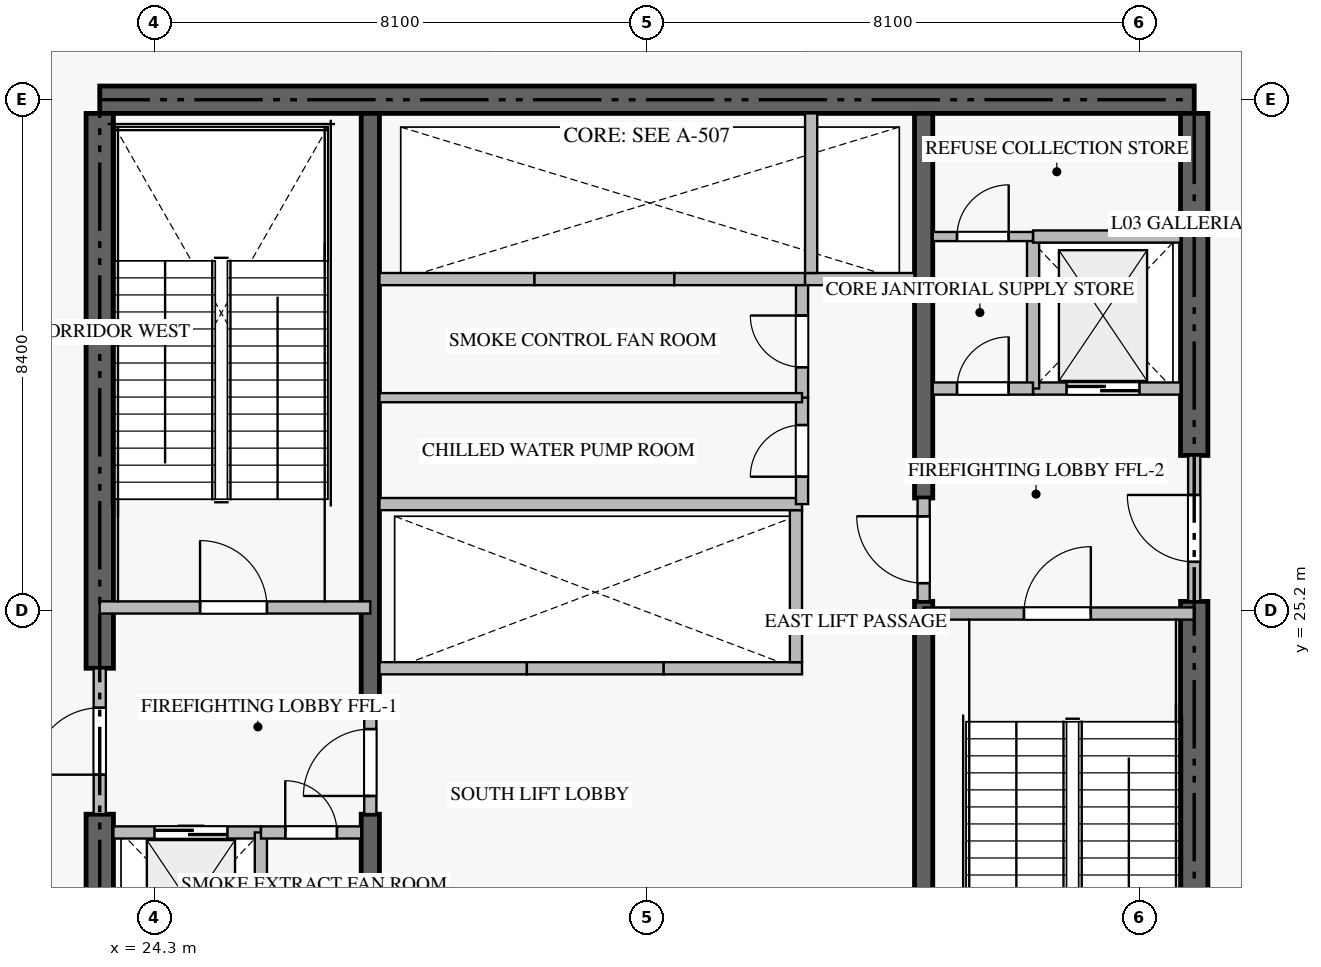
"""IFC4 building model, lengths in metres.
Left out: names, types, materials, properties, quantities, classifications, styles, units other than length and angle.
Written with IfcOpenShell. Run it as: python <this file> out.ifc"""

import sys

from ifc_helpers import new_model, si_unit, direction, frame, frame_2d, origin, place, context, subcontext, project, spatial, rectangle, extrude, source, transform, mapped, element, fill, save


model = new_model("IFC4")
c1 = context("Model", 3, precision=1e-05, world=origin(), true_north=direction((0.0, 1.0)))
c2 = subcontext(c1, "Body", "Model", "MODEL_VIEW")
j1 = project(units=[si_unit("LENGTHUNIT", "METRE"), si_unit("PLANEANGLEUNIT", "RADIAN")], contexts=[c1])
p1 = place(None, origin())
s1 = spatial("IfcSite", under=j1, at=p1, CompositionType="ELEMENT")
p2 = place(p1, origin())
s2 = spatial("IfcBuilding", under=s1, at=p2, CompositionType="ELEMENT")
p3 = place(p2, frame((0.0, 0.0, 15.3)))
s3 = spatial("IfcBuildingStorey", under=s2, at=p3, CompositionType="ELEMENT", Elevation=15.3)
p4 = place(p3, frame((41.4, 33.6, -0.38), z_axis=(0.0, 0.0, 1.0), x_axis=(-1.0, 0.0, 0.0)))
e1 = element("IfcWall", 1, at=p4, inside=s3, PredefinedType="SHEAR", context=c2, shape_type="SweptSolid", body=[
    extrude(rectangle(XDim=18.0, YDim=0.45, at=frame_2d((9.0, 0.0))), origin(), (0.0, 0.0, 1.0), 5.228),
])
p5 = place(p3, frame((23.4, 17.025, -0.38), z_axis=(0.0, 0.0, 1.0), x_axis=(0.0, 1.0, 0.0)))
e2 = element("IfcWall", 2, at=p5, inside=s3, PredefinedType="SHEAR", context=c2, shape_type="SweptSolid", body=[
    extrude(rectangle(XDim=4.825, YDim=0.45, at=frame_2d((2.413, 0.0))), origin(), (0.0, 0.0, 1.0), 5.228),
])
p6 = place(p3, frame((23.4, 24.25, -0.38), z_axis=(0.0, 0.0, 1.0), x_axis=(0.0, 1.0, 0.0)))
e3 = element("IfcWall", 3, at=p6, inside=s3, PredefinedType="SHEAR", context=c2, shape_type="SweptSolid", body=[
    extrude(rectangle(XDim=9.125, YDim=0.45, at=frame_2d((4.562, 0.0))), origin(), (0.0, 0.0, 1.0), 5.228),
])
p7 = place(p3, frame((41.4, 17.025, -0.38), z_axis=(0.0, 0.0, 1.0), x_axis=(0.0, 1.0, 0.0)))
e4 = element("IfcWall", 4, at=p7, inside=s3, PredefinedType="SHEAR", context=c2, shape_type="SweptSolid", body=[
    extrude(rectangle(XDim=8.325, YDim=0.45, at=frame_2d((4.163, 0.0))), origin(), (0.0, 0.0, 1.0), 5.228),
])
p8 = place(p3, frame((41.4, 27.75, -0.38), z_axis=(0.0, 0.0, 1.0), x_axis=(0.0, 1.0, 0.0)))
e5 = element("IfcWall", 5, at=p8, inside=s3, PredefinedType="SHEAR", context=c2, shape_type="SweptSolid", body=[
    extrude(rectangle(XDim=5.625, YDim=0.45, at=frame_2d((2.812, 0.0))), origin(), (0.0, 0.0, 1.0), 5.228),
])
p9 = place(p3, frame((27.85, 17.025, -0.38), z_axis=(0.0, 0.0, 1.0), x_axis=(0.0, 1.0, 0.0)))
e6 = element("IfcWall", 6, at=p9, inside=s3, PredefinedType="SHEAR", context=c2, shape_type="SweptSolid", body=[
    extrude(rectangle(XDim=4.825, YDim=0.3, at=frame_2d((2.413, 0.0))), origin(), (0.0, 0.0, 1.0), 5.228),
])
p10 = place(p3, frame((27.85, 23.55, -0.38), z_axis=(0.0, 0.0, 1.0), x_axis=(0.0, 1.0, 0.0)))
e7 = element("IfcWall", 7, at=p10, inside=s3, PredefinedType="SHEAR", context=c2, shape_type="SweptSolid", body=[
    extrude(rectangle(XDim=9.825, YDim=0.3, at=frame_2d((4.913, 0.0))), origin(), (0.0, 0.0, 1.0), 5.228),
])
p11 = place(p3, frame((36.95, 17.025, -0.38), z_axis=(0.0, 0.0, 1.0), x_axis=(0.0, 1.0, 0.0)))
e8 = element("IfcWall", 8, at=p11, inside=s3, PredefinedType="SHEAR", context=c2, shape_type="SweptSolid", body=[
    extrude(rectangle(XDim=8.325, YDim=0.3, at=frame_2d((4.163, 0.0))), origin(), (0.0, 0.0, 1.0), 5.228),
])
p12 = place(p3, frame((36.95, 27.05, -0.38), z_axis=(0.0, 0.0, 1.0), x_axis=(0.0, 1.0, 0.0)))
e9 = element("IfcWall", 9, at=p12, inside=s3, PredefinedType="SHEAR", context=c2, shape_type="SweptSolid", body=[
    extrude(rectangle(XDim=6.325, YDim=0.3, at=frame_2d((3.163, 0.0))), origin(), (0.0, 0.0, 1.0), 5.228),
])
p13 = place(p3, frame((23.4, 25.25, 0.0), z_axis=(0.0, 0.0, 1.0), x_axis=(1.0, 0.0, 0.0)))
e10 = element("IfcWall", 10, at=p13, inside=s3, PredefinedType="STANDARD", context=c2, shape_type="SweptSolid", body=[
    extrude(rectangle(XDim=4.45, YDim=0.2, at=frame_2d((2.225, 0.0))), origin(), (0.0, 0.0, 1.0), 4.85),
])
p14 = place(p13, frame((1.65, 0.0, 0.0)))
e11 = element("IfcOpeningElement", 11, at=p14, cuts=e10, PredefinedType="OPENING", context=c2, shape_type="SweptSolid", body=[
    extrude(rectangle(XDim=1.1, YDim=2.15, at=frame_2d((0.55, 1.075))), frame((0.0, 0.11, 0.0), z_axis=(0.0, -1.0, 0.0), x_axis=(1.0, 0.0, 0.0)), (0.0, 0.0, 1.0), 0.22),
])
p15 = place(p3, frame((36.95, 25.15, 0.0), z_axis=(0.0, 0.0, 1.0), x_axis=(1.0, 0.0, 0.0)))
e12 = element("IfcWall", 12, at=p15, inside=s3, PredefinedType="STANDARD", context=c2, shape_type="SweptSolid", body=[
    extrude(rectangle(XDim=4.45, YDim=0.2, at=frame_2d((2.225, 0.0))), origin(), (0.0, 0.0, 1.0), 4.85),
])
p16 = place(p15, frame((1.65, 0.0, 0.0)))
e13 = element("IfcOpeningElement", 13, at=p16, cuts=e12, PredefinedType="OPENING", context=c2, shape_type="SweptSolid", body=[
    extrude(rectangle(XDim=1.1, YDim=2.15, at=frame_2d((0.55, 1.075))), frame((0.0, 0.11, 0.0), z_axis=(0.0, -1.0, 0.0), x_axis=(1.0, 0.0, 0.0)), (0.0, 0.0, 1.0), 0.22),
])
p17 = place(p3, frame((23.625, 21.55, 0.0), z_axis=(0.0, 0.0, 1.0), x_axis=(1.0, 0.0, 0.0)))
e14 = element("IfcWall", 14, at=p17, inside=s3, PredefinedType="STANDARD", context=c2, shape_type="SweptSolid", body=[
    extrude(rectangle(XDim=2.425, YDim=0.2, at=frame_2d((1.212, 0.0))), origin(), (0.0, 0.0, 1.0), 4.85),
])
p18 = place(p17, frame((0.675, 0.0, 0.0)))
e15 = element("IfcOpeningElement", 15, at=p18, cuts=e14, PredefinedType="OPENING", context=c2, shape_type="SweptSolid", body=[
    extrude(rectangle(XDim=1.2, YDim=2.2, at=frame_2d((0.6, 1.1))), frame((0.0, 0.11, 0.0), z_axis=(0.0, -1.0, 0.0), x_axis=(1.0, 0.0, 0.0)), (0.0, 0.0, 1.0), 0.22),
])
p19 = place(p3, frame((38.75, 28.85, 0.0), z_axis=(0.0, 0.0, 1.0), x_axis=(1.0, 0.0, 0.0)))
e16 = element("IfcWall", 16, at=p19, inside=s3, PredefinedType="STANDARD", context=c2, shape_type="SweptSolid", body=[
    extrude(rectangle(XDim=2.425, YDim=0.2, at=frame_2d((1.212, 0.0))), origin(), (0.0, 0.0, 1.0), 4.85),
])
p20 = place(p19, frame((0.55, 0.0, 0.0)))
e17 = element("IfcOpeningElement", 17, at=p20, cuts=e16, PredefinedType="OPENING", context=c2, shape_type="SweptSolid", body=[
    extrude(rectangle(XDim=1.2, YDim=2.2, at=frame_2d((0.6, 1.1))), frame((0.0, 0.11, 0.0), z_axis=(0.0, -1.0, 0.0), x_axis=(1.0, 0.0, 0.0)), (0.0, 0.0, 1.0), 0.22),
])
p21 = place(p3, frame((28.0, 24.25, 0.0), z_axis=(0.0, 0.0, 1.0), x_axis=(1.0, 0.0, 0.0)))
e18 = element("IfcWall", 18, at=p21, inside=s3, PredefinedType="STANDARD", context=c2, shape_type="SweptSolid", body=[
    extrude(rectangle(XDim=2.425, YDim=0.2, at=frame_2d((1.212, 0.0))), origin(), (0.0, 0.0, 1.0), 4.85),
])
p22 = place(p3, frame((30.425, 24.25, 0.0), z_axis=(0.0, 0.0, 1.0), x_axis=(1.0, 0.0, 0.0)))
e19 = element("IfcWall", 19, at=p22, inside=s3, PredefinedType="STANDARD", context=c2, shape_type="SweptSolid", body=[
    extrude(rectangle(XDim=2.25, YDim=0.2, at=frame_2d((1.125, 0.0))), origin(), (0.0, 0.0, 1.0), 4.85),
])
p23 = place(p3, frame((32.675, 24.25, 0.0), z_axis=(0.0, 0.0, 1.0), x_axis=(1.0, 0.0, 0.0)))
e20 = element("IfcWall", 20, at=p23, inside=s3, PredefinedType="STANDARD", context=c2, shape_type="SweptSolid", body=[
    extrude(rectangle(XDim=2.275, YDim=0.2, at=frame_2d((1.137, 0.0))), origin(), (0.0, 0.0, 1.0), 4.85),
])
p24 = place(p3, frame((34.85, 24.35, 0.0), z_axis=(0.0, 0.0, 1.0), x_axis=(0.0, 1.0, 0.0)))
e21 = element("IfcWall", 21, at=p24, inside=s3, PredefinedType="STANDARD", context=c2, shape_type="SweptSolid", body=[
    extrude(rectangle(XDim=2.5, YDim=0.2, at=frame_2d((1.25, 0.0))), origin(), (0.0, 0.0, 1.0), 4.85),
])
p25 = place(p3, frame((28.0, 30.65, 0.0), z_axis=(0.0, 0.0, 1.0), x_axis=(1.0, 0.0, 0.0)))
e22 = element("IfcWall", 22, at=p25, inside=s3, PredefinedType="STANDARD", context=c2, shape_type="SweptSolid", body=[
    extrude(rectangle(XDim=2.55, YDim=0.2, at=frame_2d((1.275, 0.0))), origin(), (0.0, 0.0, 1.0), 4.85),
])
p26 = place(p3, frame((30.55, 30.65, 0.0), z_axis=(0.0, 0.0, 1.0), x_axis=(1.0, 0.0, 0.0)))
e23 = element("IfcWall", 23, at=p26, inside=s3, PredefinedType="STANDARD", context=c2, shape_type="SweptSolid", body=[
    extrude(rectangle(XDim=2.3, YDim=0.2, at=frame_2d((1.15, 0.0))), origin(), (0.0, 0.0, 1.0), 4.85),
])
p27 = place(p3, frame((32.85, 30.65, 0.0), z_axis=(0.0, 0.0, 1.0), x_axis=(1.0, 0.0, 0.0)))
e24 = element("IfcWall", 24, at=p27, inside=s3, PredefinedType="STANDARD", context=c2, shape_type="SweptSolid", body=[
    extrude(rectangle(XDim=2.15, YDim=0.2, at=frame_2d((1.075, 0.0))), origin(), (0.0, 0.0, 1.0), 4.85),
])
p28 = place(p3, frame((35.0, 30.65, 0.0), z_axis=(0.0, 0.0, 1.0), x_axis=(1.0, 0.0, 0.0)))
e25 = element("IfcWall", 25, at=p28, inside=s3, PredefinedType="STANDARD", context=c2, shape_type="SweptSolid", body=[
    extrude(rectangle(XDim=1.8, YDim=0.2, at=frame_2d((0.9, 0.0))), origin(), (0.0, 0.0, 1.0), 4.85),
])
p29 = place(p3, frame((35.1, 30.75, 0.0), z_axis=(0.0, 0.0, 1.0), x_axis=(0.0, 1.0, 0.0)))
e26 = element("IfcWall", 26, at=p29, inside=s3, PredefinedType="STANDARD", context=c2, shape_type="SweptSolid", body=[
    extrude(rectangle(XDim=2.625, YDim=0.2, at=frame_2d((1.312, 0.0))), origin(), (0.0, 0.0, 1.0), 4.85),
])
p30 = place(p3, frame((26.05, 19.05, 0.0), z_axis=(0.0, 0.0, 1.0), x_axis=(0.0, 1.0, 0.0)))
e27 = element("IfcWall", 27, at=p30, inside=s3, PredefinedType="STANDARD", context=c2, shape_type="SweptSolid", body=[
    extrude(rectangle(XDim=2.5, YDim=0.2, at=frame_2d((1.25, 0.0))), origin(), (0.0, 0.0, 1.0), 4.85),
])
p31 = place(p3, frame((26.052, 21.55, 0.0), z_axis=(0.0, 0.0, 1.0), x_axis=(1.0, 0.0, 0.0)))
e28 = element("IfcWall", 28, at=p31, inside=s3, PredefinedType="STANDARD", context=c2, shape_type="SweptSolid", body=[
    extrude(rectangle(XDim=1.648, YDim=0.2, at=frame_2d((0.824, 0.0))), origin(), (0.0, 0.0, 1.0), 4.85),
])
p32 = place(p31, frame((0.399, 0.0, 0.0)))
e29 = element("IfcOpeningElement", 29, at=p32, cuts=e28, PredefinedType="OPENING", context=c2, shape_type="SweptSolid", body=[
    extrude(rectangle(XDim=0.85, YDim=2.1, at=frame_2d((0.425, 1.05))), frame((0.0, 0.11, 0.0), z_axis=(0.0, -1.0, 0.0), x_axis=(1.0, 0.0, 0.0)), (0.0, 0.0, 1.0), 0.22),
])
p33 = place(p3, frame((38.75, 28.85, 0.0), z_axis=(0.0, 0.0, 1.0), x_axis=(0.0, 1.0, 0.0)))
e30 = element("IfcWall", 30, at=p33, inside=s3, PredefinedType="STANDARD", context=c2, shape_type="SweptSolid", body=[
    extrude(rectangle(XDim=2.5, YDim=0.2, at=frame_2d((1.25, 0.0))), origin(), (0.0, 0.0, 1.0), 4.85),
])
p34 = place(p3, frame((38.75, 31.35, 0.0), z_axis=(0.0, 0.0, 1.0), x_axis=(1.0, 0.0, 0.0)))
e31 = element("IfcWall", 31, at=p34, inside=s3, PredefinedType="STANDARD", context=c2, shape_type="SweptSolid", body=[
    extrude(rectangle(XDim=2.425, YDim=0.2, at=frame_2d((1.212, 0.0))), origin(), (0.0, 0.0, 1.0), 4.85),
])
p35 = place(p3, frame((37.1, 28.85, 0.0), z_axis=(0.0, 0.0, 1.0), x_axis=(1.0, 0.0, 0.0)))
e32 = element("IfcWall", 32, at=p35, inside=s3, PredefinedType="STANDARD", context=c2, shape_type="SweptSolid", body=[
    extrude(rectangle(XDim=1.648, YDim=0.2, at=frame_2d((0.824, 0.0))), origin(), (0.0, 0.0, 1.0), 4.85),
])
p36 = place(p35, frame((0.399, 0.0, 0.0)))
e33 = element("IfcOpeningElement", 33, at=p36, cuts=e32, PredefinedType="OPENING", context=c2, shape_type="SweptSolid", body=[
    extrude(rectangle(XDim=0.85, YDim=2.1, at=frame_2d((0.425, 1.05))), frame((0.0, 0.11, 0.0), z_axis=(0.0, -1.0, 0.0), x_axis=(1.0, 0.0, 0.0)), (0.0, 0.0, 1.0), 0.22),
])
p37 = place(p3, frame((23.4, 21.852, 0.0), z_axis=(0.0, 0.0, 1.0), x_axis=(0.0, 1.0, 0.0)))
e34 = element("IfcWall", 34, at=p37, inside=s3, PredefinedType="STANDARD", context=c2, shape_type="SweptSolid", body=[
    extrude(rectangle(XDim=2.396, YDim=0.2, at=frame_2d((1.198, 0.0))), origin(), (0.0, 0.0, 1.0), 4.85),
])
p38 = place(p37, frame((0.648, 0.0, 0.0)))
e35 = element("IfcOpeningElement", 35, at=p38, cuts=e34, PredefinedType="OPENING", context=c2, shape_type="SweptSolid", body=[
    extrude(rectangle(XDim=1.1, YDim=2.15, at=frame_2d((0.55, 1.075))), frame((0.0, 0.11, 0.0), z_axis=(0.0, -1.0, 0.0), x_axis=(1.0, 0.0, 0.0)), (0.0, 0.0, 1.0), 0.22),
])
p39 = place(p3, frame((41.4, 25.352, 0.0), z_axis=(0.0, 0.0, 1.0), x_axis=(0.0, 1.0, 0.0)))
e36 = element("IfcWall", 36, at=p39, inside=s3, PredefinedType="STANDARD", context=c2, shape_type="SweptSolid", body=[
    extrude(rectangle(XDim=2.396, YDim=0.2, at=frame_2d((1.198, 0.0))), origin(), (0.0, 0.0, 1.0), 4.85),
])
p40 = place(p39, frame((0.648, 0.0, 0.0)))
e37 = element("IfcOpeningElement", 37, at=p40, cuts=e36, PredefinedType="OPENING", context=c2, shape_type="SweptSolid", body=[
    extrude(rectangle(XDim=1.1, YDim=2.15, at=frame_2d((0.55, 1.075))), frame((0.0, 0.11, 0.0), z_axis=(0.0, -1.0, 0.0), x_axis=(1.0, 0.0, 0.0)), (0.0, 0.0, 1.0), 0.22),
])
p41 = place(p3, frame((27.85, 21.852, 0.0), z_axis=(0.0, 0.0, 1.0), x_axis=(0.0, 1.0, 0.0)))
e38 = element("IfcWall", 38, at=p41, inside=s3, PredefinedType="STANDARD", context=c2, shape_type="SweptSolid", body=[
    extrude(rectangle(XDim=1.696, YDim=0.2, at=frame_2d((0.848, 0.0))), origin(), (0.0, 0.0, 1.0), 4.85),
])
p42 = place(p41, frame((0.298, 0.0, 0.0)))
e39 = element("IfcOpeningElement", 39, at=p42, cuts=e38, PredefinedType="OPENING", context=c2, shape_type="SweptSolid", body=[
    extrude(rectangle(XDim=1.1, YDim=2.15, at=frame_2d((0.55, 1.075))), frame((0.0, 0.11, 0.0), z_axis=(0.0, -1.0, 0.0), x_axis=(1.0, 0.0, 0.0)), (0.0, 0.0, 1.0), 0.22),
])
p43 = place(p3, frame((36.95, 25.352, 0.0), z_axis=(0.0, 0.0, 1.0), x_axis=(0.0, 1.0, 0.0)))
e40 = element("IfcWall", 40, at=p43, inside=s3, PredefinedType="STANDARD", context=c2, shape_type="SweptSolid", body=[
    extrude(rectangle(XDim=1.696, YDim=0.2, at=frame_2d((0.848, 0.0))), origin(), (0.0, 0.0, 1.0), 4.85),
])
p44 = place(p43, frame((0.298, 0.0, 0.0)))
e41 = element("IfcOpeningElement", 41, at=p44, cuts=e40, PredefinedType="OPENING", context=c2, shape_type="SweptSolid", body=[
    extrude(rectangle(XDim=1.1, YDim=2.15, at=frame_2d((0.55, 1.075))), frame((0.0, 0.11, 0.0), z_axis=(0.0, -1.0, 0.0), x_axis=(1.0, 0.0, 0.0)), (0.0, 0.0, 1.0), 0.22),
])
p45 = place(p3, frame((28.0, 26.95, 0.0), z_axis=(0.0, 0.0, 1.0), x_axis=(1.0, 0.0, 0.0)))
e42 = element("IfcWall", 42, at=p45, inside=s3, PredefinedType="STANDARD", context=c2, shape_type="SweptSolid", body=[
    extrude(rectangle(XDim=6.95, YDim=0.2, at=frame_2d((3.475, 0.0))), origin(), (0.0, 0.0, 1.0), 4.85),
])
p46 = place(p3, frame((37.1, 31.35, 0.0), z_axis=(0.0, 0.0, 1.0), x_axis=(1.0, 0.0, 0.0)))
e43 = element("IfcWall", 43, at=p46, inside=s3, PredefinedType="PARTITIONING", context=c2, shape_type="SweptSolid", body=[
    extrude(rectangle(XDim=1.648, YDim=0.15, at=frame_2d((0.824, 0.0))), origin(), (0.0, 0.0, 1.0), 4.85),
])
p47 = place(p46, frame((0.399, 0.0, 0.0)))
e44 = element("IfcOpeningElement", 44, at=p47, cuts=e43, PredefinedType="OPENING", context=c2, shape_type="SweptSolid", body=[
    extrude(rectangle(XDim=0.85, YDim=2.1, at=frame_2d((0.425, 1.05))), frame((0.0, 0.085, 0.0), z_axis=(0.0, -1.0, 0.0), x_axis=(1.0, 0.0, 0.0)), (0.0, 0.0, 1.0), 0.17),
])
p48 = place(p3, frame((34.95, 26.95, 0.0), z_axis=(0.0, 0.0, 1.0), x_axis=(0.0, 1.0, 0.0)))
e45 = element("IfcWall", 45, at=p48, inside=s3, PredefinedType="STANDARD", context=c2, shape_type="SweptSolid", body=[
    extrude(rectangle(XDim=1.75, YDim=0.2, at=frame_2d((0.875, 0.0))), origin(), (0.0, 0.0, 1.0), 4.85),
])
p49 = place(p48, frame((0.45, 0.0, 0.0)))
e46 = element("IfcOpeningElement", 46, at=p49, cuts=e45, PredefinedType="OPENING", context=c2, shape_type="SweptSolid", body=[
    extrude(rectangle(XDim=0.85, YDim=2.1, at=frame_2d((0.425, 1.05))), frame((0.0, 0.11, 0.0), z_axis=(0.0, -1.0, 0.0), x_axis=(1.0, 0.0, 0.0)), (0.0, 0.0, 1.0), 0.22),
])
p50 = place(p3, frame((34.95, 28.702, 0.0), z_axis=(0.0, 0.0, 1.0), x_axis=(0.0, 1.0, 0.0)))
e47 = element("IfcWall", 47, at=p50, inside=s3, PredefinedType="STANDARD", context=c2, shape_type="SweptSolid", body=[
    extrude(rectangle(XDim=1.848, YDim=0.2, at=frame_2d((0.924, 0.0))), origin(), (0.0, 0.0, 1.0), 4.85),
])
p51 = place(p50, frame((0.499, 0.0, 0.0)))
e48 = element("IfcOpeningElement", 48, at=p51, cuts=e47, PredefinedType="OPENING", context=c2, shape_type="SweptSolid", body=[
    extrude(rectangle(XDim=0.85, YDim=2.1, at=frame_2d((0.425, 1.05))), frame((0.0, 0.11, 0.0), z_axis=(0.0, -1.0, 0.0), x_axis=(1.0, 0.0, 0.0)), (0.0, 0.0, 1.0), 0.22),
])
p52 = place(p3, frame((28.0, 28.7, 0.0), z_axis=(0.0, 0.0, 1.0), x_axis=(1.0, 0.0, 0.0)))
e49 = element("IfcWall", 49, at=p52, inside=s3, PredefinedType="PARTITIONING", context=c2, shape_type="SweptSolid", body=[
    extrude(rectangle(XDim=6.95, YDim=0.15, at=frame_2d((3.475, 0.0))), origin(), (0.0, 0.0, 1.0), 4.85),
])
m1 = source(origin(), c2, "Body", "SweptSolid", [
    extrude(rectangle(XDim=1.1, YDim=2.15, at=frame_2d((0.55, 1.075))), frame((0.0, 0.025, 0.0), z_axis=(0.0, -1.0, 0.0), x_axis=(1.0, 0.0, 0.0)), (0.0, 0.0, 1.0), 0.05),
])
p53 = place(p14, origin())
e50 = element("IfcDoor", 50, at=p53, inside=s3, OperationType="SINGLE_SWING_LEFT", PredefinedType="DOOR", context=c2, shape_type="MappedRepresentation", body=[
    mapped(m1, transform((0.0, 0.0, 0.0), scale=1.0)),
])
fill(e11, e50)
p54 = place(p16, origin())
e51 = element("IfcDoor", 51, at=p54, inside=s3, OperationType="SINGLE_SWING_RIGHT", PredefinedType="DOOR", context=c2, shape_type="MappedRepresentation", body=[
    mapped(m1, transform((0.0, 0.0, 0.0), scale=1.0)),
])
fill(e13, e51)
m2 = source(origin(), c2, "Body", "SweptSolid", [
    extrude(rectangle(XDim=1.2, YDim=2.2, at=frame_2d((0.6, 1.1))), frame((0.0, 0.025, 0.0), z_axis=(0.0, -1.0, 0.0), x_axis=(1.0, 0.0, 0.0)), (0.0, 0.0, 1.0), 0.05),
])
p55 = place(p18, origin())
e52 = element("IfcDoor", 52, at=p55, inside=s3, OperationType="DOUBLE_DOOR_SLIDING", PredefinedType="DOOR", context=c2, shape_type="MappedRepresentation", body=[
    mapped(m2, transform((0.0, 0.0, 0.0), scale=1.0)),
])
fill(e15, e52)
p56 = place(p20, origin())
e53 = element("IfcDoor", 53, at=p56, inside=s3, OperationType="DOUBLE_DOOR_SLIDING", PredefinedType="DOOR", context=c2, shape_type="MappedRepresentation", body=[
    mapped(m2, transform((0.0, 0.0, 0.0), scale=1.0)),
])
fill(e17, e53)
m3 = source(origin(), c2, "Body", "SweptSolid", [
    extrude(rectangle(XDim=0.85, YDim=2.1, at=frame_2d((0.425, 1.05))), frame((0.0, 0.025, 0.0), z_axis=(0.0, -1.0, 0.0), x_axis=(1.0, 0.0, 0.0)), (0.0, 0.0, 1.0), 0.05),
])
p57 = place(p32, origin())
e54 = element("IfcDoor", 54, at=p57, inside=s3, OperationType="SINGLE_SWING_LEFT", PredefinedType="DOOR", context=c2, shape_type="MappedRepresentation", body=[
    mapped(m3, transform((0.0, 0.0, 0.0), scale=1.0)),
])
fill(e29, e54)
p58 = place(p36, origin())
e55 = element("IfcDoor", 55, at=p58, inside=s3, OperationType="SINGLE_SWING_RIGHT", PredefinedType="DOOR", context=c2, shape_type="MappedRepresentation", body=[
    mapped(m3, transform((0.0, 0.0, 0.0), scale=1.0)),
])
fill(e33, e55)
p59 = place(p38, origin())
e56 = element("IfcDoor", 56, at=p59, inside=s3, OperationType="SINGLE_SWING_LEFT", PredefinedType="DOOR", context=c2, shape_type="MappedRepresentation", body=[
    mapped(m1, transform((0.0, 0.0, 0.0), scale=1.0)),
])
fill(e35, e56)
p60 = place(p40, origin())
e57 = element("IfcDoor", 57, at=p60, inside=s3, OperationType="SINGLE_SWING_RIGHT", PredefinedType="DOOR", context=c2, shape_type="MappedRepresentation", body=[
    mapped(m1, transform((0.0, 0.0, 0.0), scale=1.0)),
])
fill(e37, e57)
p61 = place(p42, origin())
e58 = element("IfcDoor", 58, at=p61, inside=s3, OperationType="SINGLE_SWING_LEFT", PredefinedType="DOOR", context=c2, shape_type="MappedRepresentation", body=[
    mapped(m1, transform((0.0, 0.0, 0.0), scale=1.0)),
])
fill(e39, e58)
p62 = place(p44, origin())
e59 = element("IfcDoor", 59, at=p62, inside=s3, OperationType="SINGLE_SWING_RIGHT", PredefinedType="DOOR", context=c2, shape_type="MappedRepresentation", body=[
    mapped(m1, transform((0.0, 0.0, 0.0), scale=1.0)),
])
fill(e41, e59)
p63 = place(p47, origin())
e60 = element("IfcDoor", 60, at=p63, inside=s3, OperationType="SINGLE_SWING_RIGHT", PredefinedType="DOOR", context=c2, shape_type="MappedRepresentation", body=[
    mapped(m3, transform((0.0, 0.0, 0.0), scale=1.0)),
])
fill(e44, e60)
p64 = place(p49, origin())
e61 = element("IfcDoor", 61, at=p64, inside=s3, OperationType="SINGLE_SWING_LEFT", PredefinedType="DOOR", context=c2, shape_type="MappedRepresentation", body=[
    mapped(m3, transform((0.0, 0.0, 0.0), scale=1.0)),
])
fill(e46, e61)
p65 = place(p51, origin())
e62 = element("IfcDoor", 62, at=p65, inside=s3, OperationType="SINGLE_SWING_RIGHT", PredefinedType="DOOR", context=c2, shape_type="MappedRepresentation", body=[
    mapped(m3, transform((0.0, 0.0, 0.0), scale=1.0)),
])
fill(e48, e62)
save(model, sys.argv[1])
